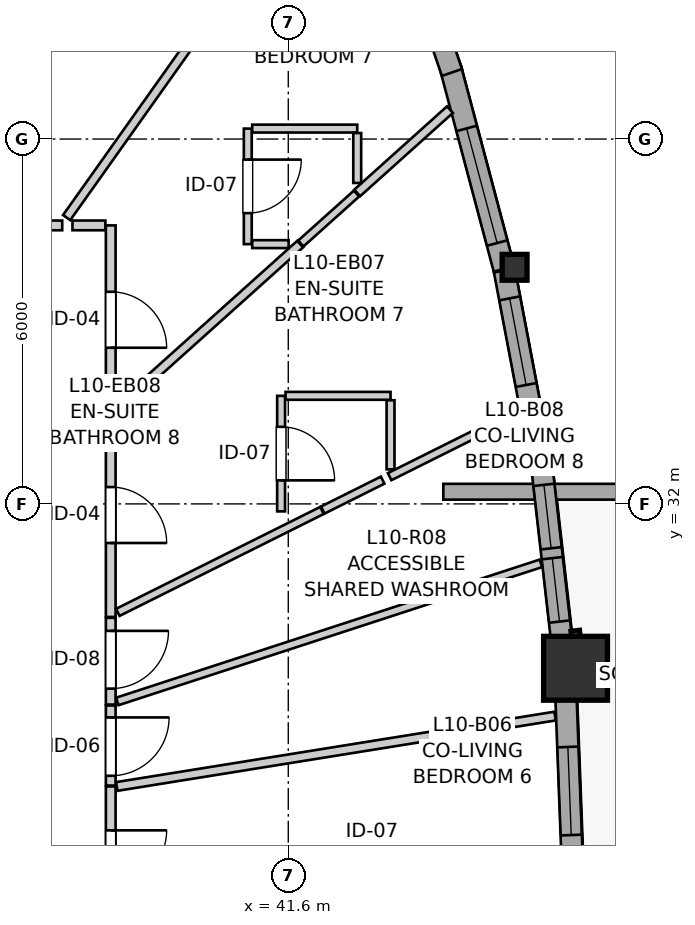
"""IFC4 building model, lengths in metres.
Left out: names, types, materials, properties, quantities, classifications, styles, units other than length and angle.
Written with IfcOpenShell. Run it as: python <this file> out.ifc"""

import sys

from ifc_helpers import new_model, si_unit, direction, frame, frame_2d, origin, origin_2d, place, context, subcontext, project, spatial, rectangle, i_section, extrude, source, transform, mapped, element, fill, save


model = new_model("IFC4")
c1 = context("Model", 3, precision=1e-05, world=origin(), true_north=direction((0.0, 1.0)))
c2 = subcontext(c1, "Body", "Model", "MODEL_VIEW")
j1 = project(units=[si_unit("LENGTHUNIT", "METRE"), si_unit("PLANEANGLEUNIT", "RADIAN")], contexts=[c1])
p1 = place(None, origin())
s1 = spatial("IfcSite", under=j1, at=p1, CompositionType="ELEMENT")
p2 = place(p1, origin())
s2 = spatial("IfcBuilding", under=s1, at=p2, CompositionType="ELEMENT")
p3 = place(p2, frame((0.0, 0.0, 36.6)))
s3 = spatial("IfcBuildingStorey", under=s2, at=p3, CompositionType="ELEMENT", Elevation=36.6)
m1 = source(origin(), c2, "Body", "SweptSolid", [
    extrude(rectangle(XDim=1.05, YDim=1.05, at=origin_2d()), origin(), (0.0, 0.0, 1.0), 2.94),
])
p4 = place(p3, frame((46.324, 29.297, 0.0), z_axis=(0.0, 0.0, 1.0), x_axis=(1.0, 0.0, 0.0)))
e1 = element("IfcColumn", 1, at=p4, inside=s3, PredefinedType="COLUMN", context=c2, shape_type="MappedRepresentation", body=[
    mapped(m1, transform((0.0, 0.0, 0.0), x_axis=(1.0, 0.0, 0.0), y_axis=(0.0, 1.0, 0.0), z_axis=(0.0, 0.0, 1.0), scale=1.0)),
])
m2 = source(origin(), c2, "Body", "SweptSolid", [
    extrude(i_section(OverallWidth=0.409, OverallDepth=0.425, WebThickness=0.03, FlangeThickness=0.048, FilletRadius=0.015, at=origin_2d()), origin(), (0.0, 0.0, 1.0), 2.94),
])
p5 = place(p3, frame((45.322, 35.891, 0.0), z_axis=(0.0, 0.0, 1.0), x_axis=(1.0, 0.0, 0.0)))
e2 = element("IfcColumn", 2, at=p5, inside=s3, PredefinedType="PILASTER", context=c2, shape_type="MappedRepresentation", body=[
    mapped(m2, transform((0.0, 0.0, 0.0), x_axis=(1.0, 0.0, 0.0), y_axis=(0.0, 1.0, 0.0), z_axis=(0.0, 0.0, 1.0), scale=1.0)),
])
p6 = place(p3, frame((65.254, 32.2, 0.0), z_axis=(0.0, 0.0, 1.0), x_axis=(-1.0, 0.0, 0.0)))
e3 = element("IfcWall", 3, at=p6, inside=s3, PredefinedType="PARAPET", context=c2, shape_type="SweptSolid", body=[
    extrude(rectangle(XDim=21.104, YDim=0.26, at=frame_2d((10.552, 0.0))), origin(), (0.0, 0.0, 1.0), 0.55),
])
p7 = place(p3, frame((46.276, 25.955, 0.0), z_axis=(0.0, 0.0, 1.0), x_axis=(-0.037939203929, 0.999280049238, 0.0)))
e4 = element("IfcWall", 4, at=p7, inside=s3, PredefinedType="SOLIDWALL", context=c2, shape_type="SweptSolid", body=[
    extrude(rectangle(XDim=3.037, YDim=0.35, at=frame_2d((1.519, 0.0))), origin(), (0.0, 0.0, 1.0), 2.42),
])
p8 = place(p7, frame((0.599, 0.0, 0.82)))
e5 = element("IfcOpeningElement", 5, at=p8, cuts=e4, PredefinedType="OPENING", context=c2, shape_type="SweptSolid", body=[
    extrude(rectangle(XDim=1.45, YDim=1.25, at=frame_2d((0.725, 0.625))), frame((0.0, 0.185, 0.0), z_axis=(0.0, -1.0, 0.0), x_axis=(1.0, 0.0, 0.0)), (0.0, 0.0, 1.0), 0.37),
])
p9 = place(p3, frame((46.116, 29.575, 0.0), z_axis=(0.0, 0.0, 1.0), x_axis=(-0.113271733229, 0.993564046477, 0.0)))
e6 = element("IfcWall", 6, at=p9, inside=s3, PredefinedType="SOLIDWALL", context=c2, shape_type="SweptSolid", body=[
    extrude(rectangle(XDim=3.056, YDim=0.35, at=frame_2d((1.528, 0.0))), origin(), (0.0, 0.0, 1.0), 2.42),
])
p10 = place(p9, frame((0.492, 0.0, 0.82)))
e7 = element("IfcOpeningElement", 7, at=p10, cuts=e6, PredefinedType="OPENING", context=c2, shape_type="SweptSolid", body=[
    extrude(rectangle(XDim=1.05, YDim=1.45, at=frame_2d((0.525, 0.725))), frame((0.0, 0.185, 0.0), z_axis=(0.0, -1.0, 0.0), x_axis=(1.0, 0.0, 0.0)), (0.0, 0.0, 1.0), 0.37),
])
p11 = place(p9, frame((1.706, 0.0, 0.82)))
e8 = element("IfcOpeningElement", 8, at=p11, cuts=e6, PredefinedType="OPENING", context=c2, shape_type="SweptSolid", body=[
    extrude(rectangle(XDim=1.05, YDim=1.45, at=frame_2d((0.525, 0.725))), frame((0.0, 0.185, 0.0), z_axis=(0.0, -1.0, 0.0), x_axis=(1.0, 0.0, 0.0)), (0.0, 0.0, 1.0), 0.37),
])
p12 = place(p3, frame((45.784, 32.524, 0.0), z_axis=(0.0, 0.0, 1.0), x_axis=(-0.186686485801, 0.982419541754, 0.0)))
e9 = element("IfcWall", 9, at=p12, inside=s3, PredefinedType="SOLIDWALL", context=c2, shape_type="SweptSolid", body=[
    extrude(rectangle(XDim=3.374, YDim=0.35, at=frame_2d((1.687, 0.0))), origin(), (0.0, 0.0, 1.0), 2.42),
])
p13 = place(p12, frame((1.457, 0.0, 0.82)))
e10 = element("IfcOpeningElement", 10, at=p13, cuts=e9, PredefinedType="OPENING", context=c2, shape_type="SweptSolid", body=[
    extrude(rectangle(XDim=1.45, YDim=1.25, at=frame_2d((0.725, 0.625))), frame((0.0, 0.185, 0.0), z_axis=(0.0, -1.0, 0.0), x_axis=(1.0, 0.0, 0.0)), (0.0, 0.0, 1.0), 0.37),
])
p14 = place(p3, frame((45.148, 35.865, 0.0), z_axis=(0.0, 0.0, 1.0), x_axis=(-0.257064434129, 0.966394265663, 0.0)))
e11 = element("IfcWall", 11, at=p14, inside=s3, PredefinedType="SOLIDWALL", context=c2, shape_type="SweptSolid", body=[
    extrude(rectangle(XDim=3.429, YDim=0.35, at=frame_2d((1.715, 0.0))), origin(), (0.0, 0.0, 1.0), 2.42),
])
p15 = place(p14, frame((0.44, 0.0, 0.82)))
e12 = element("IfcOpeningElement", 12, at=p15, cuts=e11, PredefinedType="OPENING", context=c2, shape_type="SweptSolid", body=[
    extrude(rectangle(XDim=1.95, YDim=1.4, at=frame_2d((0.975, 0.7))), frame((0.0, 0.185, 0.0), z_axis=(0.0, -1.0, 0.0), x_axis=(1.0, 0.0, 0.0)), (0.0, 0.0, 1.0), 0.37),
])
p16 = place(p3, frame((44.292, 39.095, 0.0), z_axis=(0.0, 0.0, 1.0), x_axis=(-0.323582370233, 0.946200005112, 0.0)))
e13 = element("IfcWall", 13, at=p16, inside=s3, PredefinedType="SOLIDWALL", context=c2, shape_type="SweptSolid", body=[
    extrude(rectangle(XDim=3.222, YDim=0.35, at=frame_2d((1.611, 0.0))), origin(), (0.0, 0.0, 1.0), 2.42),
])
p17 = place(p16, frame((0.816, 0.0, 0.82)))
e14 = element("IfcOpeningElement", 14, at=p17, cuts=e13, PredefinedType="OPENING", context=c2, shape_type="SweptSolid", body=[
    extrude(rectangle(XDim=1.6, YDim=1.35, at=frame_2d((0.8, 0.675))), frame((0.0, 0.185, 0.0), z_axis=(0.0, -1.0, 0.0), x_axis=(1.0, 0.0, 0.0)), (0.0, 0.0, 1.0), 0.37),
])
p18 = place(p3, frame((38.68, 33.496, 0.0), z_axis=(0.0, 0.0, 1.0), x_axis=(0.0, -1.0, 0.0)))
e15 = element("IfcWall", 15, at=p18, inside=s3, PredefinedType="PARTITIONING", context=c2, shape_type="SweptSolid", body=[
    extrude(rectangle(XDim=3.355, YDim=0.16, at=frame_2d((1.677, 0.0))), origin(), (0.0, 0.0, 1.0), 2.94),
])
p19 = place(p18, frame((1.219, 0.0, 0.0)))
e16 = element("IfcOpeningElement", 16, at=p19, cuts=e15, PredefinedType="OPENING", context=c2, shape_type="SweptSolid", body=[
    extrude(rectangle(XDim=0.92, YDim=2.1, at=frame_2d((0.46, 1.05))), frame((0.0, 0.09, 0.0), z_axis=(0.0, -1.0, 0.0), x_axis=(1.0, 0.0, 0.0)), (0.0, 0.0, 1.0), 0.18),
])
p20 = place(p3, frame((38.68, 36.58, 0.0), z_axis=(0.0, 0.0, 1.0), x_axis=(0.0, -1.0, 0.0)))
e17 = element("IfcWall", 17, at=p20, inside=s3, PredefinedType="PARTITIONING", context=c2, shape_type="SweptSolid", body=[
    extrude(rectangle(XDim=3.069, YDim=0.16, at=frame_2d((1.535, 0.0))), origin(), (0.0, 0.0, 1.0), 2.94),
])
p21 = place(p20, frame((1.092, 0.0, 0.0)))
e18 = element("IfcOpeningElement", 18, at=p21, cuts=e17, PredefinedType="OPENING", context=c2, shape_type="SweptSolid", body=[
    extrude(rectangle(XDim=0.92, YDim=2.1, at=frame_2d((0.46, 1.05))), frame((0.0, 0.09, 0.0), z_axis=(0.0, -1.0, 0.0), x_axis=(1.0, 0.0, 0.0)), (0.0, 0.0, 1.0), 0.18),
])
p22 = place(p3, frame((38.68, 27.353, 0.0), z_axis=(0.0, 0.0, 1.0), x_axis=(0.0, -1.0, 0.0)))
e19 = element("IfcWall", 19, at=p22, inside=s3, PredefinedType="PARTITIONING", context=c2, shape_type="SweptSolid", body=[
    extrude(rectangle(XDim=2.317, YDim=0.16, at=frame_2d((1.159, 0.0))), origin(), (0.0, 0.0, 1.0), 2.94),
])
p23 = place(p22, frame((0.721, 0.0, 0.0)))
e20 = element("IfcOpeningElement", 20, at=p23, cuts=e19, PredefinedType="OPENING", context=c2, shape_type="SweptSolid", body=[
    extrude(rectangle(XDim=0.92, YDim=2.1, at=frame_2d((0.46, 1.05))), frame((0.0, 0.09, 0.0), z_axis=(0.0, -1.0, 0.0), x_axis=(1.0, 0.0, 0.0)), (0.0, 0.0, 1.0), 0.18),
])
p24 = place(p3, frame((41.482, 33.777, 0.0), z_axis=(0.0, 0.0, 1.0), x_axis=(0.0, -1.0, 0.0)))
e21 = element("IfcWall", 21, at=p24, inside=s3, PredefinedType="PARTITIONING", context=c2, shape_type="SweptSolid", body=[
    extrude(rectangle(XDim=1.9, YDim=0.13, at=frame_2d((0.95, 0.0))), origin(), (0.0, 0.0, 1.0), 2.94),
])
p25 = place(p24, frame((0.51, 0.0, 0.0)))
e22 = element("IfcOpeningElement", 22, at=p25, cuts=e21, PredefinedType="OPENING", context=c2, shape_type="SweptSolid", body=[
    extrude(rectangle(XDim=0.88, YDim=2.05, at=frame_2d((0.44, 1.025))), frame((0.0, 0.075, 0.0), z_axis=(0.0, -1.0, 0.0), x_axis=(1.0, 0.0, 0.0)), (0.0, 0.0, 1.0), 0.15),
])
p26 = place(p3, frame((40.934, 38.172, 0.0), z_axis=(0.0, 0.0, 1.0), x_axis=(0.0, -1.0, 0.0)))
e23 = element("IfcWall", 23, at=p26, inside=s3, PredefinedType="PARTITIONING", context=c2, shape_type="SweptSolid", body=[
    extrude(rectangle(XDim=1.9, YDim=0.13, at=frame_2d((0.95, 0.0))), origin(), (0.0, 0.0, 1.0), 2.94),
])
p27 = place(p26, frame((0.51, 0.0, 0.0)))
e24 = element("IfcOpeningElement", 24, at=p27, cuts=e23, PredefinedType="OPENING", context=c2, shape_type="SweptSolid", body=[
    extrude(rectangle(XDim=0.88, YDim=2.05, at=frame_2d((0.44, 1.025))), frame((0.0, 0.075, 0.0), z_axis=(0.0, -1.0, 0.0), x_axis=(1.0, 0.0, 0.0)), (0.0, 0.0, 1.0), 0.15),
])
p28 = place(p3, frame((36.042, 36.58, 0.0), z_axis=(0.0, 0.0, 1.0), x_axis=(1.0, 0.0, 0.0)))
e25 = element("IfcWall", 25, at=p28, inside=s3, PredefinedType="PARTITIONING", context=c2, shape_type="SweptSolid", body=[
    extrude(rectangle(XDim=1.84, YDim=0.16, at=frame_2d((0.92, 0.0))), origin(), (0.0, 0.0, 1.0), 2.94),
])
p29 = place(p28, frame((0.459, 0.0, 0.0)))
e26 = element("IfcOpeningElement", 26, at=p29, cuts=e25, PredefinedType="OPENING", context=c2, shape_type="SweptSolid", body=[
    extrude(rectangle(XDim=0.92, YDim=2.1, at=frame_2d((0.46, 1.05))), frame((0.0, 0.09, 0.0), z_axis=(0.0, -1.0, 0.0), x_axis=(1.0, 0.0, 0.0)), (0.0, 0.0, 1.0), 0.18),
])
p30 = place(p3, frame((38.68, 30.126, 0.0), z_axis=(0.0, 0.0, 1.0), x_axis=(0.0, -1.0, 0.0)))
e27 = element("IfcWall", 27, at=p30, inside=s3, PredefinedType="PARTITIONING", context=c2, shape_type="SweptSolid", body=[
    extrude(rectangle(XDim=1.426, YDim=0.16, at=frame_2d((0.713, 0.0))), origin(), (0.0, 0.0, 1.0), 2.94),
])
p31 = place(p30, frame((0.214, 0.0, 0.0)))
e28 = element("IfcOpeningElement", 28, at=p31, cuts=e27, PredefinedType="OPENING", context=c2, shape_type="SweptSolid", body=[
    extrude(rectangle(XDim=0.95, YDim=2.1, at=frame_2d((0.475, 1.05))), frame((0.0, 0.09, 0.0), z_axis=(0.0, -1.0, 0.0), x_axis=(1.0, 0.0, 0.0)), (0.0, 0.0, 1.0), 0.18),
])
p32 = place(p3, frame((38.68, 28.685, 0.0), z_axis=(0.0, 0.0, 1.0), x_axis=(0.0, -1.0, 0.0)))
e29 = element("IfcWall", 29, at=p32, inside=s3, PredefinedType="PARTITIONING", context=c2, shape_type="SweptSolid", body=[
    extrude(rectangle(XDim=1.317, YDim=0.16, at=frame_2d((0.659, 0.0))), origin(), (0.0, 0.0, 1.0), 2.94),
])
p33 = place(p32, frame((0.196, 0.0, 0.0)))
e30 = element("IfcOpeningElement", 30, at=p33, cuts=e29, PredefinedType="OPENING", context=c2, shape_type="SweptSolid", body=[
    extrude(rectangle(XDim=0.96, YDim=2.1, at=frame_2d((0.48, 1.05))), frame((0.0, 0.09, 0.0), z_axis=(0.0, -1.0, 0.0), x_axis=(1.0, 0.0, 0.0)), (0.0, 0.0, 1.0), 0.18),
])
p34 = place(p3, frame((34.686, 36.695, 0.0), z_axis=(0.0, 0.0, 1.0), x_axis=(0.375735926904, 0.926726773776, 0.0)))
e31 = element("IfcWall", 31, at=p34, inside=s3, PredefinedType="PARTITIONING", context=c2, shape_type="SweptSolid", body=[
    extrude(rectangle(XDim=11.769, YDim=0.145, at=frame_2d((5.884, 0.0))), origin(), (0.0, 0.0, 1.0), 2.94),
])
p35 = place(p3, frame((36.125, 36.701, 0.0), z_axis=(0.0, 0.0, 1.0), x_axis=(0.474948586069, 0.880013545686, 0.0)))
e32 = element("IfcWall", 32, at=p35, inside=s3, PredefinedType="PARTITIONING", context=c2, shape_type="SweptSolid", body=[
    extrude(rectangle(XDim=10.889, YDim=0.145, at=frame_2d((5.445, 0.0))), origin(), (0.0, 0.0, 1.0), 2.94),
])
p36 = place(p3, frame((37.955, 36.708, 0.0), z_axis=(0.0, 0.0, 1.0), x_axis=(0.578991718582, 0.81533342248, 0.0)))
e33 = element("IfcWall", 33, at=p36, inside=s3, PredefinedType="PARTITIONING", context=c2, shape_type="SweptSolid", body=[
    extrude(rectangle(XDim=8.325, YDim=0.145, at=frame_2d((4.163, 0.0))), origin(), (0.0, 0.0, 1.0), 2.94),
])
p37 = place(p3, frame((38.788, 28.751, 0.0), z_axis=(0.0, 0.0, 1.0), x_axis=(0.95075822996, 0.309933522169, 0.0)))
e34 = element("IfcWall", 34, at=p37, inside=s3, PredefinedType="PARTITIONING", context=c2, shape_type="SweptSolid", body=[
    extrude(rectangle(XDim=7.327, YDim=0.13, at=frame_2d((3.664, 0.0))), origin(), (0.0, 0.0, 1.0), 2.94),
])
p38 = place(p3, frame((38.779, 27.353, 0.0), z_axis=(0.0, 0.0, 1.0), x_axis=(0.987345710334, 0.158582622897, 0.0)))
e35 = element("IfcWall", 35, at=p38, inside=s3, PredefinedType="PARTITIONING", context=c2, shape_type="SweptSolid", body=[
    extrude(rectangle(XDim=7.3, YDim=0.145, at=frame_2d((3.65, 0.0))), origin(), (0.0, 0.0, 1.0), 2.94),
])
p39 = place(p3, frame((38.814, 33.597, 0.0), z_axis=(0.0, 0.0, 1.0), x_axis=(0.74417856937, 0.667980730927, 0.0)))
e36 = element("IfcWall", 36, at=p39, inside=s3, PredefinedType="PARTITIONING", context=c2, shape_type="SweptSolid", body=[
    extrude(rectangle(XDim=4.005, YDim=0.145, at=frame_2d((2.002, 0.0))), origin(), (0.0, 0.0, 1.0), 2.94),
])
p40 = place(p3, frame((38.796, 30.216, 0.0), z_axis=(0.0, 0.0, 1.0), x_axis=(0.894739227469, 0.446588977503, 0.0)))
e37 = element("IfcWall", 37, at=p40, inside=s3, PredefinedType="PARTITIONING", context=c2, shape_type="SweptSolid", body=[
    extrude(rectangle(XDim=3.753, YDim=0.13, at=frame_2d((1.876, 0.0))), origin(), (0.0, 0.0, 1.0), 2.94),
])
p41 = place(p3, frame((43.267, 32.448, 0.0), z_axis=(0.0, 0.0, 1.0), x_axis=(0.894755827923, 0.446555717014, 0.0)))
e38 = element("IfcWall", 38, at=p41, inside=s3, PredefinedType="PARTITIONING", context=c2, shape_type="SweptSolid", body=[
    extrude(rectangle(XDim=2.375, YDim=0.13, at=frame_2d((1.188, 0.0))), origin(), (0.0, 0.0, 1.0), 2.94),
])
p42 = place(p3, frame((42.734, 37.114, 0.0), z_axis=(0.0, 0.0, 1.0), x_axis=(0.743962922365, 0.668220899214, 0.0)))
e39 = element("IfcWall", 39, at=p42, inside=s3, PredefinedType="PARTITIONING", context=c2, shape_type="SweptSolid", body=[
    extrude(rectangle(XDim=2.05, YDim=0.145, at=frame_2d((1.025, 0.0))), origin(), (0.0, 0.0, 1.0), 2.94),
])
p43 = place(p3, frame((41.007, 38.172, 0.0), z_axis=(0.0, 0.0, 1.0), x_axis=(1.0, 0.0, 0.0)))
e40 = element("IfcWall", 40, at=p43, inside=s3, PredefinedType="PARTITIONING", context=c2, shape_type="SweptSolid", body=[
    extrude(rectangle(XDim=1.727, YDim=0.13, at=frame_2d((0.863, 0.0))), origin(), (0.0, 0.0, 1.0), 2.94),
])
p44 = place(p3, frame((41.555, 33.777, 0.0), z_axis=(0.0, 0.0, 1.0), x_axis=(1.0, 0.0, 0.0)))
e41 = element("IfcWall", 41, at=p44, inside=s3, PredefinedType="PARTITIONING", context=c2, shape_type="SweptSolid", body=[
    extrude(rectangle(XDim=1.727, YDim=0.13, at=frame_2d((0.864, 0.0))), origin(), (0.0, 0.0, 1.0), 2.94),
])
p45 = place(p3, frame((43.282, 32.568, 0.0), z_axis=(0.0, 0.0, 1.0), x_axis=(0.0, 1.0, 0.0)))
e42 = element("IfcWall", 42, at=p45, inside=s3, PredefinedType="PARTITIONING", context=c2, shape_type="SweptSolid", body=[
    extrude(rectangle(XDim=1.136, YDim=0.13, at=frame_2d((0.568, 0.0))), origin(), (0.0, 0.0, 1.0), 2.94),
])
p46 = place(p3, frame((41.806, 36.282, 0.0), z_axis=(0.0, 0.0, 1.0), x_axis=(0.744525261569, 0.667594289135, 0.0)))
e43 = element("IfcWall", 43, at=p46, inside=s3, PredefinedType="PARTITIONING", context=c2, shape_type="SweptSolid", body=[
    extrude(rectangle(XDim=1.231, YDim=0.13, at=frame_2d((0.616, 0.0))), origin(), (0.0, 0.0, 1.0), 2.94),
])
p47 = place(p3, frame((42.167, 31.899, 0.0), z_axis=(0.0, 0.0, 1.0), x_axis=(0.894604533516, 0.446858734515, 0.0)))
e44 = element("IfcWall", 44, at=p47, inside=s3, PredefinedType="PARTITIONING", context=c2, shape_type="SweptSolid", body=[
    extrude(rectangle(XDim=1.101, YDim=0.13, at=frame_2d((0.55, 0.0))), origin(), (0.0, 0.0, 1.0), 2.94),
])
p48 = place(p3, frame((42.734, 37.278, 0.0), z_axis=(0.0, 0.0, 1.0), x_axis=(0.0, 1.0, 0.0)))
e45 = element("IfcWall", 45, at=p48, inside=s3, PredefinedType="PARTITIONING", context=c2, shape_type="SweptSolid", body=[
    extrude(rectangle(XDim=0.821, YDim=0.13, at=frame_2d((0.411, 0.0))), origin(), (0.0, 0.0, 1.0), 2.94),
])
p49 = place(p3, frame((41.007, 36.272, 0.0), z_axis=(0.0, 0.0, 1.0), x_axis=(1.0, 0.0, 0.0)))
e46 = element("IfcWall", 46, at=p49, inside=s3, PredefinedType="PARTITIONING", context=c2, shape_type="SweptSolid", body=[
    extrude(rectangle(XDim=0.599, YDim=0.13, at=frame_2d((0.299, 0.0))), origin(), (0.0, 0.0, 1.0), 2.94),
])
p50 = place(p3, frame((38.051, 36.58, 0.0), z_axis=(0.0, 0.0, 1.0), x_axis=(1.0, 0.0, 0.0)))
e47 = element("IfcWall", 47, at=p50, inside=s3, PredefinedType="PARTITIONING", context=c2, shape_type="SweptSolid", body=[
    extrude(rectangle(XDim=0.541, YDim=0.16, at=frame_2d((0.271, 0.0))), origin(), (0.0, 0.0, 1.0), 2.94),
])
m3 = source(origin(), c2, "Body", "SweptSolid", [
    extrude(rectangle(XDim=1.45, YDim=1.25, at=frame_2d((0.725, 0.625))), frame((0.0, 0.03, 0.0), z_axis=(0.0, -1.0, 0.0), x_axis=(1.0, 0.0, 0.0)), (0.0, 0.0, 1.0), 0.06),
])
p51 = place(p8, origin())
e48 = element("IfcWindow", 48, at=p51, inside=s3, PartitioningType="SINGLE_PANEL", PredefinedType="WINDOW", context=c2, shape_type="MappedRepresentation", body=[
    mapped(m3, transform((0.0, 0.0, 0.0), x_axis=(1.0, 0.0, 0.0), y_axis=(0.0, 1.0, 0.0), z_axis=(0.0, 0.0, 1.0), scale=1.0)),
])
fill(e5, e48)
m4 = source(origin(), c2, "Body", "SweptSolid", [
    extrude(rectangle(XDim=1.05, YDim=1.45, at=frame_2d((0.525, 0.725))), frame((0.0, 0.03, 0.0), z_axis=(0.0, -1.0, 0.0), x_axis=(1.0, 0.0, 0.0)), (0.0, 0.0, 1.0), 0.06),
])
p52 = place(p10, origin())
e49 = element("IfcWindow", 49, at=p52, inside=s3, PartitioningType="SINGLE_PANEL", PredefinedType="WINDOW", context=c2, shape_type="MappedRepresentation", body=[
    mapped(m4, transform((0.0, 0.0, 0.0), x_axis=(1.0, 0.0, 0.0), y_axis=(0.0, 1.0, 0.0), z_axis=(0.0, 0.0, 1.0), scale=1.0)),
])
fill(e7, e49)
p53 = place(p11, origin())
e50 = element("IfcWindow", 50, at=p53, inside=s3, PartitioningType="SINGLE_PANEL", PredefinedType="WINDOW", context=c2, shape_type="MappedRepresentation", body=[
    mapped(m4, transform((0.0, 0.0, 0.0), x_axis=(1.0, 0.0, 0.0), y_axis=(0.0, 1.0, 0.0), z_axis=(0.0, 0.0, 1.0), scale=1.0)),
])
fill(e8, e50)
p54 = place(p13, origin())
e51 = element("IfcWindow", 51, at=p54, inside=s3, PartitioningType="SINGLE_PANEL", PredefinedType="WINDOW", context=c2, shape_type="MappedRepresentation", body=[
    mapped(m3, transform((0.0, 0.0, 0.0), x_axis=(1.0, 0.0, 0.0), y_axis=(0.0, 1.0, 0.0), z_axis=(0.0, 0.0, 1.0), scale=1.0)),
])
fill(e10, e51)
m5 = source(origin(), c2, "Body", "SweptSolid", [
    extrude(rectangle(XDim=1.95, YDim=1.4, at=frame_2d((0.975, 0.7))), frame((0.0, 0.03, 0.0), z_axis=(0.0, -1.0, 0.0), x_axis=(1.0, 0.0, 0.0)), (0.0, 0.0, 1.0), 0.06),
])
p55 = place(p15, origin())
e52 = element("IfcWindow", 52, at=p55, inside=s3, PartitioningType="SINGLE_PANEL", PredefinedType="WINDOW", context=c2, shape_type="MappedRepresentation", body=[
    mapped(m5, transform((0.0, 0.0, 0.0), x_axis=(1.0, 0.0, 0.0), y_axis=(0.0, 1.0, 0.0), z_axis=(0.0, 0.0, 1.0), scale=1.0)),
])
fill(e12, e52)
m6 = source(origin(), c2, "Body", "SweptSolid", [
    extrude(rectangle(XDim=0.92, YDim=2.1, at=frame_2d((0.46, 1.05))), frame((0.0, 0.025, 0.0), z_axis=(0.0, -1.0, 0.0), x_axis=(1.0, 0.0, 0.0)), (0.0, 0.0, 1.0), 0.05),
])
p56 = place(p19, origin())
e53 = element("IfcDoor", 53, at=p56, inside=s3, OperationType="SINGLE_SWING_RIGHT", PredefinedType="DOOR", context=c2, shape_type="MappedRepresentation", body=[
    mapped(m6, transform((0.0, 0.0, 0.0), x_axis=(1.0, 0.0, 0.0), y_axis=(0.0, 1.0, 0.0), z_axis=(0.0, 0.0, 1.0), scale=1.0)),
])
fill(e16, e53)
p57 = place(p21, origin())
e54 = element("IfcDoor", 54, at=p57, inside=s3, OperationType="SINGLE_SWING_RIGHT", PredefinedType="DOOR", context=c2, shape_type="MappedRepresentation", body=[
    mapped(m6, transform((0.0, 0.0, 0.0), x_axis=(1.0, 0.0, 0.0), y_axis=(0.0, 1.0, 0.0), z_axis=(0.0, 0.0, 1.0), scale=1.0)),
])
fill(e18, e54)
p58 = place(p23, origin())
e55 = element("IfcDoor", 55, at=p58, inside=s3, OperationType="SINGLE_SWING_LEFT", PredefinedType="DOOR", context=c2, shape_type="MappedRepresentation", body=[
    mapped(m6, transform((0.0, 0.0, 0.0), x_axis=(1.0, 0.0, 0.0), y_axis=(0.0, 1.0, 0.0), z_axis=(0.0, 0.0, 1.0), scale=1.0)),
])
fill(e20, e55)
m7 = source(origin(), c2, "Body", "SweptSolid", [
    extrude(rectangle(XDim=0.88, YDim=2.05, at=frame_2d((0.44, 1.025))), frame((0.0, 0.025, 0.0), z_axis=(0.0, -1.0, 0.0), x_axis=(1.0, 0.0, 0.0)), (0.0, 0.0, 1.0), 0.05),
])
p59 = place(p25, origin())
e56 = element("IfcDoor", 56, at=p59, inside=s3, OperationType="SINGLE_SWING_RIGHT", PredefinedType="DOOR", context=c2, shape_type="MappedRepresentation", body=[
    mapped(m7, transform((0.0, 0.0, 0.0), x_axis=(1.0, 0.0, 0.0), y_axis=(0.0, 1.0, 0.0), z_axis=(0.0, 0.0, 1.0), scale=1.0)),
])
fill(e22, e56)
p60 = place(p27, origin())
e57 = element("IfcDoor", 57, at=p60, inside=s3, OperationType="SINGLE_SWING_LEFT", PredefinedType="DOOR", context=c2, shape_type="MappedRepresentation", body=[
    mapped(m7, transform((0.0, 0.0, 0.0), x_axis=(1.0, 0.0, 0.0), y_axis=(0.0, 1.0, 0.0), z_axis=(0.0, 0.0, 1.0), scale=1.0)),
])
fill(e24, e57)
m8 = source(origin(), c2, "Body", "SweptSolid", [
    extrude(rectangle(XDim=0.95, YDim=2.1, at=frame_2d((0.475, 1.05))), frame((0.0, 0.025, 0.0), z_axis=(0.0, -1.0, 0.0), x_axis=(1.0, 0.0, 0.0)), (0.0, 0.0, 1.0), 0.05),
])
p61 = place(p31, origin())
e58 = element("IfcDoor", 58, at=p61, inside=s3, OperationType="SINGLE_SWING_LEFT", PredefinedType="DOOR", context=c2, shape_type="MappedRepresentation", body=[
    mapped(m8, transform((0.0, 0.0, 0.0), x_axis=(1.0, 0.0, 0.0), y_axis=(0.0, 1.0, 0.0), z_axis=(0.0, 0.0, 1.0), scale=1.0)),
])
fill(e28, e58)
m9 = source(origin(), c2, "Body", "SweptSolid", [
    extrude(rectangle(XDim=0.96, YDim=2.1, at=frame_2d((0.48, 1.05))), frame((0.0, 0.025, 0.0), z_axis=(0.0, -1.0, 0.0), x_axis=(1.0, 0.0, 0.0)), (0.0, 0.0, 1.0), 0.05),
])
p62 = place(p33, origin())
e59 = element("IfcDoor", 59, at=p62, inside=s3, OperationType="SINGLE_SWING_LEFT", PredefinedType="DOOR", context=c2, shape_type="MappedRepresentation", body=[
    mapped(m9, transform((0.0, 0.0, 0.0), x_axis=(1.0, 0.0, 0.0), y_axis=(0.0, 1.0, 0.0), z_axis=(0.0, 0.0, 1.0), scale=1.0)),
])
fill(e30, e59)
save(model, sys.argv[1])
